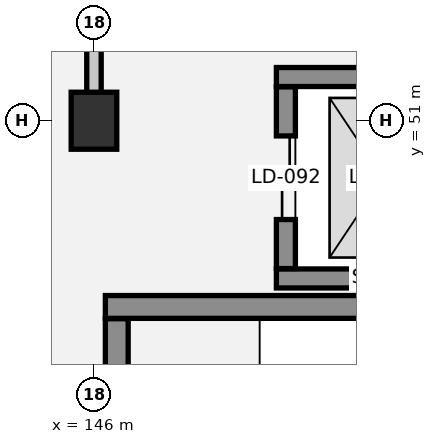
"""IFC4 building model, lengths in metres.
Left out: names, types, materials, properties, quantities, classifications, styles, units other than length and angle.
Written with IfcOpenShell. Run it as: python <this file> out.ifc"""

import sys

from ifc_helpers import new_model, si_unit, direction, frame, frame_2d, origin, origin_2d, place, context, subcontext, project, spatial, rectangle, extrude, element, fill, save


model = new_model("IFC4")
c1 = context("Model", 3, precision=1e-05, world=origin(), true_north=direction((0.0, 1.0)))
c2 = subcontext(c1, "Body", "Model", "MODEL_VIEW")
j1 = project(units=[si_unit("LENGTHUNIT", "METRE"), si_unit("PLANEANGLEUNIT", "RADIAN")], contexts=[c1])
p1 = place(None, origin())
s1 = spatial("IfcSite", under=j1, at=p1, CompositionType="ELEMENT")
p2 = place(p1, origin())
s2 = spatial("IfcBuilding", under=s1, at=p2, CompositionType="ELEMENT")
p3 = place(p2, frame((0.0, 0.0, 22.05)))
s3 = spatial("IfcBuildingStorey", under=s2, at=p3, CompositionType="ELEMENT", Elevation=22.05)
p4 = place(p3, frame((146.0, 51.0, 0.0), z_axis=(0.0, 0.0, 1.0), x_axis=(1.0, 0.0, 0.0)))
e1 = element("IfcColumn", 1, at=p4, inside=s3, PredefinedType="COLUMN", context=c2, shape_type="SweptSolid", body=[
    extrude(rectangle(XDim=0.6, YDim=0.75, at=origin_2d()), origin(), (0.0, 0.0, 1.0), 3.75),
])
for number, where, z_axis, x_axis in (
    (2, (148.4, 48.925, 0.0), (0.0, 0.0, 1.0), (1.0, 0.0, 0.0)),
    (3, (151.2, 51.575, 0.0), (0.0, 0.0, 1.0), (-1.0, 0.0, 0.0)),
):
    element("IfcWall", number, at=place(p3, frame(where, z_axis=z_axis, x_axis=x_axis)), inside=s3, PredefinedType="SHEAR", context=c2, shape_type="SweptSolid", body=[
        extrude(rectangle(XDim=2.8, YDim=0.25, at=frame_2d((1.4, 0.0))), origin(), (0.0, 0.0, 1.0), 3.47),
    ])
p5 = place(p3, frame((148.525, 51.445, 0.0), z_axis=(0.0, 0.0, 1.0), x_axis=(0.0, -1.0, 0.0)))
e4 = element("IfcWall", 4, at=p5, inside=s3, PredefinedType="SHEAR", context=c2, shape_type="SweptSolid", body=[
    extrude(rectangle(XDim=2.39, YDim=0.25, at=frame_2d((1.195, 0.0))), origin(), (0.0, 0.0, 1.0), 3.47),
])
p6 = place(p5, frame((0.645, 0.0, 0.0)))
e5 = element("IfcOpeningElement", 5, at=p6, cuts=e4, PredefinedType="OPENING", context=c2, shape_type="SweptSolid", body=[
    extrude(rectangle(XDim=1.1, YDim=2.15, at=frame_2d((0.55, 1.075))), frame((0.0, 0.135, 0.0), z_axis=(0.0, -1.0, 0.0), x_axis=(1.0, 0.0, 0.0)), (0.0, 0.0, 1.0), 0.27),
])
p7 = place(p3, frame((153.85, 48.55, 0.0), z_axis=(0.0, 0.0, 1.0), x_axis=(-1.0, 0.0, 0.0)))
e6 = element("IfcWall", 6, at=p7, inside=s3, PredefinedType="SHEAR", context=c2, shape_type="SweptSolid", body=[
    extrude(rectangle(XDim=7.7, YDim=0.3, at=frame_2d((3.85, 0.0))), origin(), (0.0, 0.0, 1.0), 3.47),
])
p8 = place(p3, frame((146.3, 48.395, 0.0), z_axis=(0.0, 0.0, 1.0), x_axis=(0.0, -1.0, 0.0)))
e7 = element("IfcWall", 7, at=p8, inside=s3, PredefinedType="SHEAR", context=c2, shape_type="SweptSolid", body=[
    extrude(rectangle(XDim=3.99, YDim=0.3, at=frame_2d((1.995, 0.0))), origin(), (0.0, 0.0, 1.0), 3.47),
])
p9 = place(p8, frame((1.37, 0.0, 0.0)))
e8 = element("IfcOpeningElement", 8, at=p9, cuts=e7, PredefinedType="OPENING", context=c2, shape_type="SweptSolid", body=[
    extrude(rectangle(XDim=1.25, YDim=2.15, at=frame_2d((0.625, 1.075))), frame((0.0, 0.16, 0.0), z_axis=(0.0, -1.0, 0.0), x_axis=(1.0, 0.0, 0.0)), (0.0, 0.0, 1.0), 0.32),
])
p10 = place(p3, frame((146.0, 51.35, 0.0), z_axis=(0.0, 0.0, 1.0), x_axis=(0.0, 1.0, 0.0)))
e9 = element("IfcWall", 9, at=p10, inside=s3, PredefinedType="PARTITIONING", context=c2, shape_type="SweptSolid", body=[
    extrude(rectangle(XDim=12.17, YDim=0.19, at=frame_2d((6.085, 0.0))), origin(), (0.0, 0.0, 1.0), 2.58),
])
p11 = place(p6, origin())
e10 = element("IfcDoor", 10, at=p11, inside=s3, OperationType="DOUBLE_DOOR_SLIDING", PredefinedType="DOOR", context=c2, shape_type="SweptSolid", body=[
    extrude(rectangle(XDim=1.1, YDim=2.15, at=frame_2d((0.55, 1.075))), frame((0.0, 0.025, 0.0), z_axis=(0.0, -1.0, 0.0), x_axis=(1.0, 0.0, 0.0)), (0.0, 0.0, 1.0), 0.05),
])
fill(e5, e10)
save(model, sys.argv[1])
